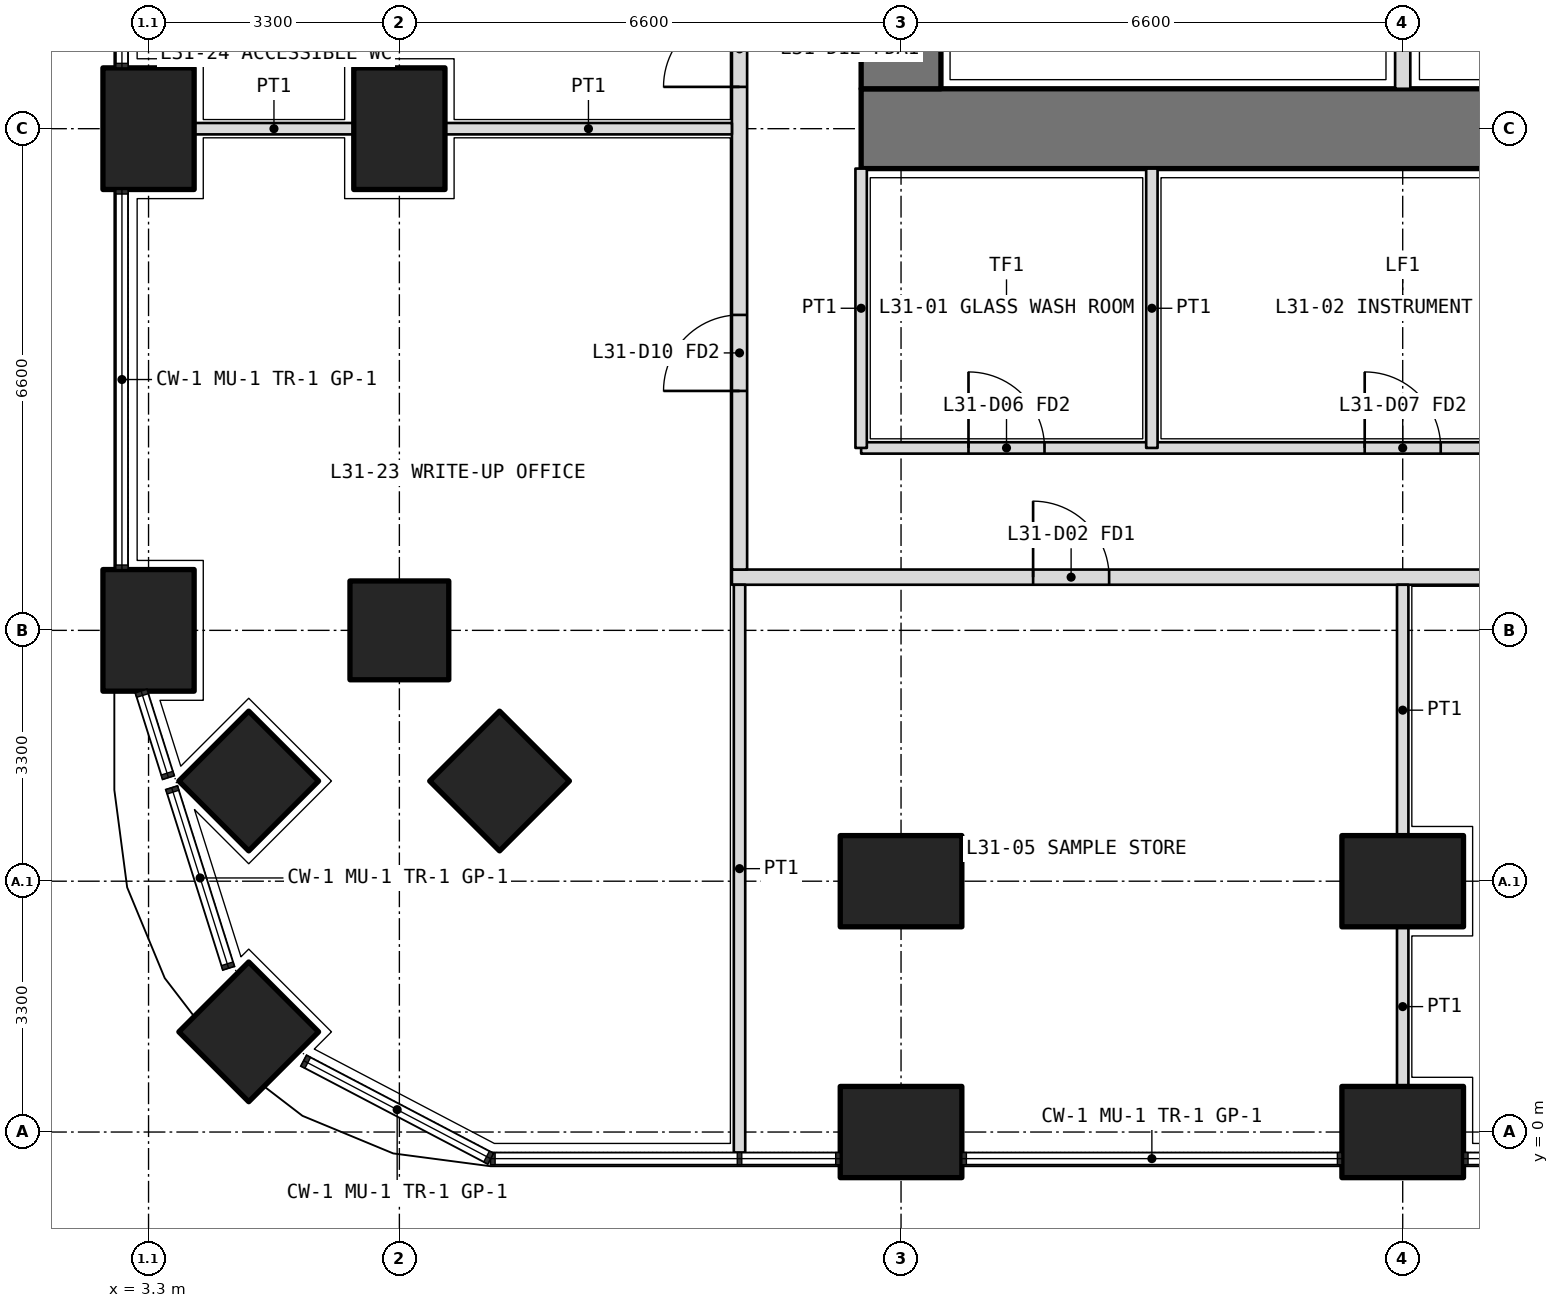
"""IFC4 building model, lengths in metres.
Left out: names, types, materials, properties, quantities, classifications, styles, units other than length and angle.
Written with IfcOpenShell. Run it as: python <this file> out.ifc"""

import sys

from ifc_helpers import new_model, si_unit, direction, frame, frame_2d, origin, origin_2d, place, context, subcontext, project, spatial, rectangle, extrude, element, fill, save


model = new_model("IFC4")
c1 = context("Model", 3, precision=1e-05, world=origin(), true_north=direction((0.0, 1.0)))
c2 = subcontext(c1, "Body", "Model", "MODEL_VIEW")
j1 = project(units=[si_unit("LENGTHUNIT", "METRE"), si_unit("PLANEANGLEUNIT", "RADIAN")], contexts=[c1])
p1 = place(None, origin())
s1 = spatial("IfcSite", under=j1, at=p1, CompositionType="ELEMENT")
p2 = place(p1, origin())
s2 = spatial("IfcBuilding", under=s1, at=p2, CompositionType="ELEMENT")
p3 = place(p2, frame((0.0, 0.0, 136.8)))
s3 = spatial("IfcBuildingStorey", under=s2, at=p3, CompositionType="ELEMENT", Elevation=136.8)
p4 = place(p3, frame((4.618, 1.318, 0.0), z_axis=(0.0, 0.0, 1.0), x_axis=(0.707106781187, 0.707106781187, 0.0)))
e1 = element("IfcColumn", 1, at=p4, inside=s3, PredefinedType="COLUMN", context=c2, shape_type="SweptSolid", body=[
    extrude(rectangle(XDim=1.3, YDim=1.3, at=origin_2d()), origin(), (0.0, 0.0, 1.0), 4.2),
])
for number, where, z_axis, x_axis in (
    (2, (13.2, 0.0, 0.0), (0.0, 0.0, 1.0), (1.0, 0.0, 0.0)),
    (3, (19.8, 0.0, 0.0), (0.0, 0.0, 1.0), (1.0, 0.0, 0.0)),
    (4, (3.3, 6.6, 0.0), (0.0, 0.0, 1.0), (0.0, 1.0, 0.0)),
    (5, (3.3, 13.2, 0.0), (0.0, 0.0, 1.0), (0.0, 1.0, 0.0)),
):
    element("IfcColumn", number, at=place(p3, frame(where, z_axis=z_axis, x_axis=x_axis)), inside=s3, PredefinedType="COLUMN", context=c2, shape_type="SweptSolid", body=[
        extrude(rectangle(XDim=1.6, YDim=1.2, at=origin_2d()), origin(), (0.0, 0.0, 1.0), 4.2),
    ])
for number, where, z_axis, x_axis in (
    (6, (6.6, 6.6, 0.0), (0.0, 0.0, 1.0), (1.0, 0.0, 0.0)),
    (7, (4.618, 4.618, 0.0), (0.0, 0.0, 1.0), (0.707, 0.707, 0.0)),
):
    element("IfcColumn", number, at=place(p3, frame(where, z_axis=z_axis, x_axis=x_axis)), inside=s3, PredefinedType="COLUMN", context=c2, shape_type="SweptSolid", body=[
        extrude(rectangle(XDim=1.3, YDim=1.3, at=origin_2d()), origin(), (0.0, 0.0, 1.0), 4.2),
    ])
for number, where, z_axis, x_axis in (
    (8, (13.2, 3.3, 0.0), (0.0, 0.0, 1.0), (1.0, 0.0, 0.0)),
    (9, (19.8, 3.3, 0.0), (0.0, 0.0, 1.0), (1.0, 0.0, 0.0)),
):
    element("IfcColumn", number, at=place(p3, frame(where, z_axis=z_axis, x_axis=x_axis)), inside=s3, PredefinedType="COLUMN", context=c2, shape_type="SweptSolid", body=[
        extrude(rectangle(XDim=1.6, YDim=1.2, at=origin_2d()), origin(), (0.0, 0.0, 1.0), 4.2),
    ])
p5 = place(p3, frame((7.918, 4.618, 0.0), z_axis=(0.0, 0.0, 1.0), x_axis=(0.707106781187, 0.707106781187, 0.0)))
e10 = element("IfcColumn", 10, at=p5, inside=s3, PredefinedType="COLUMN", context=c2, shape_type="SweptSolid", body=[
    extrude(rectangle(XDim=1.3, YDim=1.3, at=origin_2d()), origin(), (0.0, 0.0, 1.0), 4.2),
])
p6 = place(p3, frame((6.6, 13.2, 0.0), z_axis=(0.0, 0.0, 1.0), x_axis=(0.0, 1.0, 0.0)))
e11 = element("IfcColumn", 11, at=p6, inside=s3, PredefinedType="COLUMN", context=c2, shape_type="SweptSolid", body=[
    extrude(rectangle(XDim=1.6, YDim=1.2, at=origin_2d()), origin(), (0.0, 0.0, 1.0), 4.2),
])
p7 = place(p3, frame((12.675, 13.2, 0.0), z_axis=(0.0, 0.0, 1.0), x_axis=(1.0, 0.0, 0.0)))
e12 = element("IfcWall", 12, at=p7, inside=s3, PredefinedType="SHEAR", context=c2, shape_type="SweptSolid", body=[
    extrude(rectangle(XDim=27.45, YDim=1.05, at=frame_2d((13.725, 0.0))), origin(), (0.0, 0.0, 1.0), 4.2),
])
p8 = place(p3, frame((13.2, 32.475, 0.0), z_axis=(0.0, 0.0, 1.0), x_axis=(0.0, -1.0, 0.0)))
e13 = element("IfcWall", 13, at=p8, inside=s3, PredefinedType="SHEAR", context=c2, shape_type="SweptSolid", body=[
    extrude(rectangle(XDim=18.75, YDim=1.05, at=frame_2d((9.375, 0.0))), origin(), (0.0, 0.0, 1.0), 4.2),
])
p9 = place(p8, frame((14.125, 0.0, 0.0)))
e14 = element("IfcOpeningElement", 14, at=p9, cuts=e13, PredefinedType="OPENING", context=c2, shape_type="SweptSolid", body=[
    extrude(rectangle(XDim=1.6, YDim=2.1, at=frame_2d((0.8, 1.05))), frame((0.0, 0.535, 0.0), z_axis=(0.0, -1.0, 0.0), x_axis=(1.0, 0.0, 0.0)), (0.0, 0.0, 1.0), 1.07),
])
p10 = place(p8, frame((3.325, 0.0, 0.0)))
e15 = element("IfcOpeningElement", 15, at=p10, cuts=e13, PredefinedType="OPENING", context=c2, shape_type="SweptSolid", body=[
    extrude(rectangle(XDim=1.6, YDim=2.1, at=frame_2d((0.8, 1.05))), frame((0.0, 0.535, 0.0), z_axis=(0.0, -1.0, 0.0), x_axis=(1.0, 0.0, 0.0)), (0.0, 0.0, 1.0), 1.07),
])
p11 = place(p3, frame((19.8, 13.725, 0.0), z_axis=(0.0, 0.0, 1.0), x_axis=(0.0, 1.0, 0.0)))
e16 = element("IfcWall", 16, at=p11, inside=s3, PredefinedType="PARTITIONING", context=c2, shape_type="SweptSolid", body=[
    extrude(rectangle(XDim=1.975, YDim=0.2, at=frame_2d((0.987, 0.0))), origin(), (0.0, 0.0, 1.0), 4.2),
])
p12 = place(p3, frame((12.675, 9.0, 0.0), z_axis=(0.0, 0.0, 1.0), x_axis=(1.0, 0.0, 0.0)))
e17 = element("IfcWall", 17, at=p12, inside=s3, PredefinedType="PARTITIONING", context=c2, shape_type="SweptSolid", body=[
    extrude(rectangle(XDim=27.45, YDim=0.15, at=frame_2d((13.725, 0.0))), origin(), (0.0, 0.0, 1.0), 2.85),
])
p13 = place(p12, frame((1.413, 0.0, 0.0)))
e18 = element("IfcOpeningElement", 18, at=p13, cuts=e17, PredefinedType="OPENING", context=c2, shape_type="SweptSolid", body=[
    extrude(rectangle(XDim=1.0, YDim=2.1, at=frame_2d((0.5, 1.05))), frame((0.0, 0.085, 0.0), z_axis=(0.0, -1.0, 0.0), x_axis=(1.0, 0.0, 0.0)), (0.0, 0.0, 1.0), 0.17),
])
p14 = place(p12, frame((6.625, 0.0, 0.0)))
e19 = element("IfcOpeningElement", 19, at=p14, cuts=e17, PredefinedType="OPENING", context=c2, shape_type="SweptSolid", body=[
    extrude(rectangle(XDim=1.0, YDim=2.1, at=frame_2d((0.5, 1.05))), frame((0.0, 0.085, 0.0), z_axis=(0.0, -1.0, 0.0), x_axis=(1.0, 0.0, 0.0)), (0.0, 0.0, 1.0), 0.17),
])
p15 = place(p12, frame((14.875, 0.0, 0.0)))
e20 = element("IfcOpeningElement", 20, at=p15, cuts=e17, PredefinedType="OPENING", context=c2, shape_type="SweptSolid", body=[
    extrude(rectangle(XDim=1.0, YDim=2.1, at=frame_2d((0.5, 1.05))), frame((0.0, 0.085, 0.0), z_axis=(0.0, -1.0, 0.0), x_axis=(1.0, 0.0, 0.0)), (0.0, 0.0, 1.0), 0.17),
])
p16 = place(p12, frame((23.387, 0.0, 0.0)))
e21 = element("IfcOpeningElement", 21, at=p16, cuts=e17, PredefinedType="OPENING", context=c2, shape_type="SweptSolid", body=[
    extrude(rectangle(XDim=1.0, YDim=2.1, at=frame_2d((0.5, 1.05))), frame((0.0, 0.085, 0.0), z_axis=(0.0, -1.0, 0.0), x_axis=(1.0, 0.0, 0.0)), (0.0, 0.0, 1.0), 0.17),
])
p17 = place(p3, frame((12.675, 12.675, 0.0), z_axis=(0.0, 0.0, 1.0), x_axis=(0.0, -1.0, 0.0)))
e22 = element("IfcWall", 22, at=p17, inside=s3, PredefinedType="PARTITIONING", context=c2, shape_type="SweptSolid", body=[
    extrude(rectangle(XDim=3.675, YDim=0.15, at=frame_2d((1.837, 0.0))), origin(), (0.0, 0.0, 1.0), 2.85),
])
p18 = place(p3, frame((16.5, 12.675, 0.0), z_axis=(0.0, 0.0, 1.0), x_axis=(0.0, -1.0, 0.0)))
e23 = element("IfcWall", 23, at=p18, inside=s3, PredefinedType="PARTITIONING", context=c2, shape_type="SweptSolid", body=[
    extrude(rectangle(XDim=3.675, YDim=0.15, at=frame_2d((1.837, 0.0))), origin(), (0.0, 0.0, 1.0), 3.9),
])
p19 = place(p3, frame((10.975, 7.3, 0.0), z_axis=(0.0, 0.0, 1.0), x_axis=(1.0, 0.0, 0.0)))
e24 = element("IfcWall", 24, at=p19, inside=s3, PredefinedType="PARTITIONING", context=c2, shape_type="SweptSolid", body=[
    extrude(rectangle(XDim=30.85, YDim=0.2, at=frame_2d((15.425, 0.0))), origin(), (0.0, 0.0, 1.0), 2.85),
])
p20 = place(p19, frame((3.962, 0.0, 0.0)))
e25 = element("IfcOpeningElement", 25, at=p20, cuts=e24, PredefinedType="OPENING", context=c2, shape_type="SweptSolid", body=[
    extrude(rectangle(XDim=1.0, YDim=2.1, at=frame_2d((0.5, 1.05))), frame((0.0, 0.11, 0.0), z_axis=(0.0, -1.0, 0.0), x_axis=(1.0, 0.0, 0.0)), (0.0, 0.0, 1.0), 0.22),
])
p21 = place(p19, frame((13.275, 0.0, 0.0)))
e26 = element("IfcOpeningElement", 26, at=p21, cuts=e24, PredefinedType="OPENING", context=c2, shape_type="SweptSolid", body=[
    extrude(rectangle(XDim=1.0, YDim=2.1, at=frame_2d((0.5, 1.05))), frame((0.0, 0.11, 0.0), z_axis=(0.0, -1.0, 0.0), x_axis=(1.0, 0.0, 0.0)), (0.0, 0.0, 1.0), 0.22),
])
p22 = place(p19, frame((21.525, 0.0, 0.0)))
e27 = element("IfcOpeningElement", 27, at=p22, cuts=e24, PredefinedType="OPENING", context=c2, shape_type="SweptSolid", body=[
    extrude(rectangle(XDim=1.0, YDim=2.1, at=frame_2d((0.5, 1.05))), frame((0.0, 0.11, 0.0), z_axis=(0.0, -1.0, 0.0), x_axis=(1.0, 0.0, 0.0)), (0.0, 0.0, 1.0), 0.22),
])
p23 = place(p19, frame((27.438, 0.0, 0.0)))
e28 = element("IfcOpeningElement", 28, at=p23, cuts=e24, PredefinedType="OPENING", context=c2, shape_type="SweptSolid", body=[
    extrude(rectangle(XDim=1.2, YDim=2.1, at=frame_2d((0.6, 1.05))), frame((0.0, 0.11, 0.0), z_axis=(0.0, -1.0, 0.0), x_axis=(1.0, 0.0, 0.0)), (0.0, 0.0, 1.0), 0.22),
])
p24 = place(p3, frame((11.075, 7.4, 0.0), z_axis=(0.0, 0.0, 1.0), x_axis=(0.0, 1.0, 0.0)))
e29 = element("IfcWall", 29, at=p24, inside=s3, PredefinedType="PARTITIONING", context=c2, shape_type="SweptSolid", body=[
    extrude(rectangle(XDim=27.625, YDim=0.2, at=frame_2d((13.812, 0.0))), origin(), (0.0, 0.0, 1.0), 2.85),
])
p25 = place(p24, frame((2.35, 0.0, 0.0)))
e30 = element("IfcOpeningElement", 30, at=p25, cuts=e29, PredefinedType="OPENING", context=c2, shape_type="SweptSolid", body=[
    extrude(rectangle(XDim=1.0, YDim=2.1, at=frame_2d((0.5, 1.05))), frame((0.0, 0.11, 0.0), z_axis=(0.0, -1.0, 0.0), x_axis=(1.0, 0.0, 0.0)), (0.0, 0.0, 1.0), 0.22),
])
p26 = place(p24, frame((6.35, 0.0, 0.0)))
e31 = element("IfcOpeningElement", 31, at=p26, cuts=e29, PredefinedType="OPENING", context=c2, shape_type="SweptSolid", body=[
    extrude(rectangle(XDim=1.0, YDim=2.1, at=frame_2d((0.5, 1.05))), frame((0.0, 0.11, 0.0), z_axis=(0.0, -1.0, 0.0), x_axis=(1.0, 0.0, 0.0)), (0.0, 0.0, 1.0), 0.22),
])
p27 = place(p24, frame((9.425, 0.0, 0.0)))
e32 = element("IfcOpeningElement", 32, at=p27, cuts=e29, PredefinedType="OPENING", context=c2, shape_type="SweptSolid", body=[
    extrude(rectangle(XDim=0.9, YDim=2.1, at=frame_2d((0.45, 1.05))), frame((0.0, 0.11, 0.0), z_axis=(0.0, -1.0, 0.0), x_axis=(1.0, 0.0, 0.0)), (0.0, 0.0, 1.0), 0.22),
])
p28 = place(p24, frame((13.275, 0.0, 0.0)))
e33 = element("IfcOpeningElement", 33, at=p28, cuts=e29, PredefinedType="OPENING", context=c2, shape_type="SweptSolid", body=[
    extrude(rectangle(XDim=0.9, YDim=2.1, at=frame_2d((0.45, 1.05))), frame((0.0, 0.11, 0.0), z_axis=(0.0, -1.0, 0.0), x_axis=(1.0, 0.0, 0.0)), (0.0, 0.0, 1.0), 0.22),
])
p29 = place(p24, frame((16.8, 0.0, 0.0)))
e34 = element("IfcOpeningElement", 34, at=p29, cuts=e29, PredefinedType="OPENING", context=c2, shape_type="SweptSolid", body=[
    extrude(rectangle(XDim=1.0, YDim=2.1, at=frame_2d((0.5, 1.05))), frame((0.0, 0.11, 0.0), z_axis=(0.0, -1.0, 0.0), x_axis=(1.0, 0.0, 0.0)), (0.0, 0.0, 1.0), 0.22),
])
p30 = place(p24, frame((21.8, 0.0, 0.0)))
e35 = element("IfcOpeningElement", 35, at=p30, cuts=e29, PredefinedType="OPENING", context=c2, shape_type="SweptSolid", body=[
    extrude(rectangle(XDim=1.0, YDim=2.1, at=frame_2d((0.5, 1.05))), frame((0.0, 0.11, 0.0), z_axis=(0.0, -1.0, 0.0), x_axis=(1.0, 0.0, 0.0)), (0.0, 0.0, 1.0), 0.22),
])
p31 = place(p24, frame((26.163, 0.0, 0.0)))
e36 = element("IfcOpeningElement", 36, at=p31, cuts=e29, PredefinedType="OPENING", context=c2, shape_type="SweptSolid", body=[
    extrude(rectangle(XDim=1.0, YDim=2.1, at=frame_2d((0.5, 1.05))), frame((0.0, 0.11, 0.0), z_axis=(0.0, -1.0, 0.0), x_axis=(1.0, 0.0, 0.0)), (0.0, 0.0, 1.0), 0.22),
])
p32 = place(p3, frame((11.075, -0.27, 0.0), z_axis=(0.0, 0.0, 1.0), x_axis=(0.0, 1.0, 0.0)))
e37 = element("IfcWall", 37, at=p32, inside=s3, PredefinedType="PARTITIONING", context=c2, shape_type="SweptSolid", body=[
    extrude(rectangle(XDim=7.47, YDim=0.15, at=frame_2d((3.735, 0.0))), origin(), (0.0, 0.0, 1.0), 2.6),
])
p33 = place(p3, frame((19.8, 0.6, 0.0), z_axis=(0.0, 0.0, 1.0), x_axis=(0.0, 1.0, 0.0)))
e38 = element("IfcWall", 38, at=p33, inside=s3, PredefinedType="PARTITIONING", context=c2, shape_type="SweptSolid", body=[
    extrude(rectangle(XDim=2.1, YDim=0.15, at=frame_2d((1.05, 0.0))), origin(), (0.0, 0.0, 1.0), 2.85),
])
p34 = place(p3, frame((19.8, 3.9, 0.0), z_axis=(0.0, 0.0, 1.0), x_axis=(0.0, 1.0, 0.0)))
e39 = element("IfcWall", 39, at=p34, inside=s3, PredefinedType="PARTITIONING", context=c2, shape_type="SweptSolid", body=[
    extrude(rectangle(XDim=3.3, YDim=0.15, at=frame_2d((1.65, 0.0))), origin(), (0.0, 0.0, 1.0), 2.85),
])
p35 = place(p3, frame((3.9, 13.2, 0.0), z_axis=(0.0, 0.0, 1.0), x_axis=(1.0, 0.0, 0.0)))
e40 = element("IfcWall", 40, at=p35, inside=s3, PredefinedType="PARTITIONING", context=c2, shape_type="SweptSolid", body=[
    extrude(rectangle(XDim=2.1, YDim=0.15, at=frame_2d((1.05, 0.0))), origin(), (0.0, 0.0, 1.0), 2.85),
])
p36 = place(p3, frame((7.2, 13.2, 0.0), z_axis=(0.0, 0.0, 1.0), x_axis=(1.0, 0.0, 0.0)))
e41 = element("IfcWall", 41, at=p36, inside=s3, PredefinedType="PARTITIONING", context=c2, shape_type="SweptSolid", body=[
    extrude(rectangle(XDim=3.775, YDim=0.15, at=frame_2d((1.888, 0.0))), origin(), (0.0, 0.0, 1.0), 2.85),
])
p37 = place(p13, origin())
e42 = element("IfcDoor", 42, at=p37, inside=s3, OperationType="SINGLE_SWING_LEFT", PredefinedType="DOOR", context=c2, shape_type="SweptSolid", body=[
    extrude(rectangle(XDim=1.0, YDim=2.1, at=frame_2d((0.5, 1.05))), frame((0.0, 0.025, 0.0), z_axis=(0.0, -1.0, 0.0), x_axis=(1.0, 0.0, 0.0)), (0.0, 0.0, 1.0), 0.05),
])
fill(e18, e42)
p38 = place(p14, origin())
e43 = element("IfcDoor", 43, at=p38, inside=s3, OperationType="SINGLE_SWING_LEFT", PredefinedType="DOOR", context=c2, shape_type="SweptSolid", body=[
    extrude(rectangle(XDim=1.0, YDim=2.1, at=frame_2d((0.5, 1.05))), frame((0.0, 0.025, 0.0), z_axis=(0.0, -1.0, 0.0), x_axis=(1.0, 0.0, 0.0)), (0.0, 0.0, 1.0), 0.05),
])
fill(e19, e43)
p39 = place(p20, origin())
e44 = element("IfcDoor", 44, at=p39, inside=s3, OperationType="SINGLE_SWING_LEFT", PredefinedType="DOOR", context=c2, shape_type="SweptSolid", body=[
    extrude(rectangle(XDim=1.0, YDim=2.1, at=frame_2d((0.5, 1.05))), frame((0.0, 0.025, 0.0), z_axis=(0.0, -1.0, 0.0), x_axis=(1.0, 0.0, 0.0)), (0.0, 0.0, 1.0), 0.05),
])
fill(e25, e44)
p40 = place(p25, origin())
e45 = element("IfcDoor", 45, at=p40, inside=s3, OperationType="SINGLE_SWING_LEFT", PredefinedType="DOOR", context=c2, shape_type="SweptSolid", body=[
    extrude(rectangle(XDim=1.0, YDim=2.1, at=frame_2d((0.5, 1.05))), frame((0.0, 0.025, 0.0), z_axis=(0.0, -1.0, 0.0), x_axis=(1.0, 0.0, 0.0)), (0.0, 0.0, 1.0), 0.05),
])
fill(e30, e45)
p41 = place(p26, origin())
e46 = element("IfcDoor", 46, at=p41, inside=s3, OperationType="SINGLE_SWING_LEFT", PredefinedType="DOOR", context=c2, shape_type="SweptSolid", body=[
    extrude(rectangle(XDim=1.0, YDim=2.1, at=frame_2d((0.5, 1.05))), frame((0.0, 0.025, 0.0), z_axis=(0.0, -1.0, 0.0), x_axis=(1.0, 0.0, 0.0)), (0.0, 0.0, 1.0), 0.05),
])
fill(e31, e46)
save(model, sys.argv[1])
